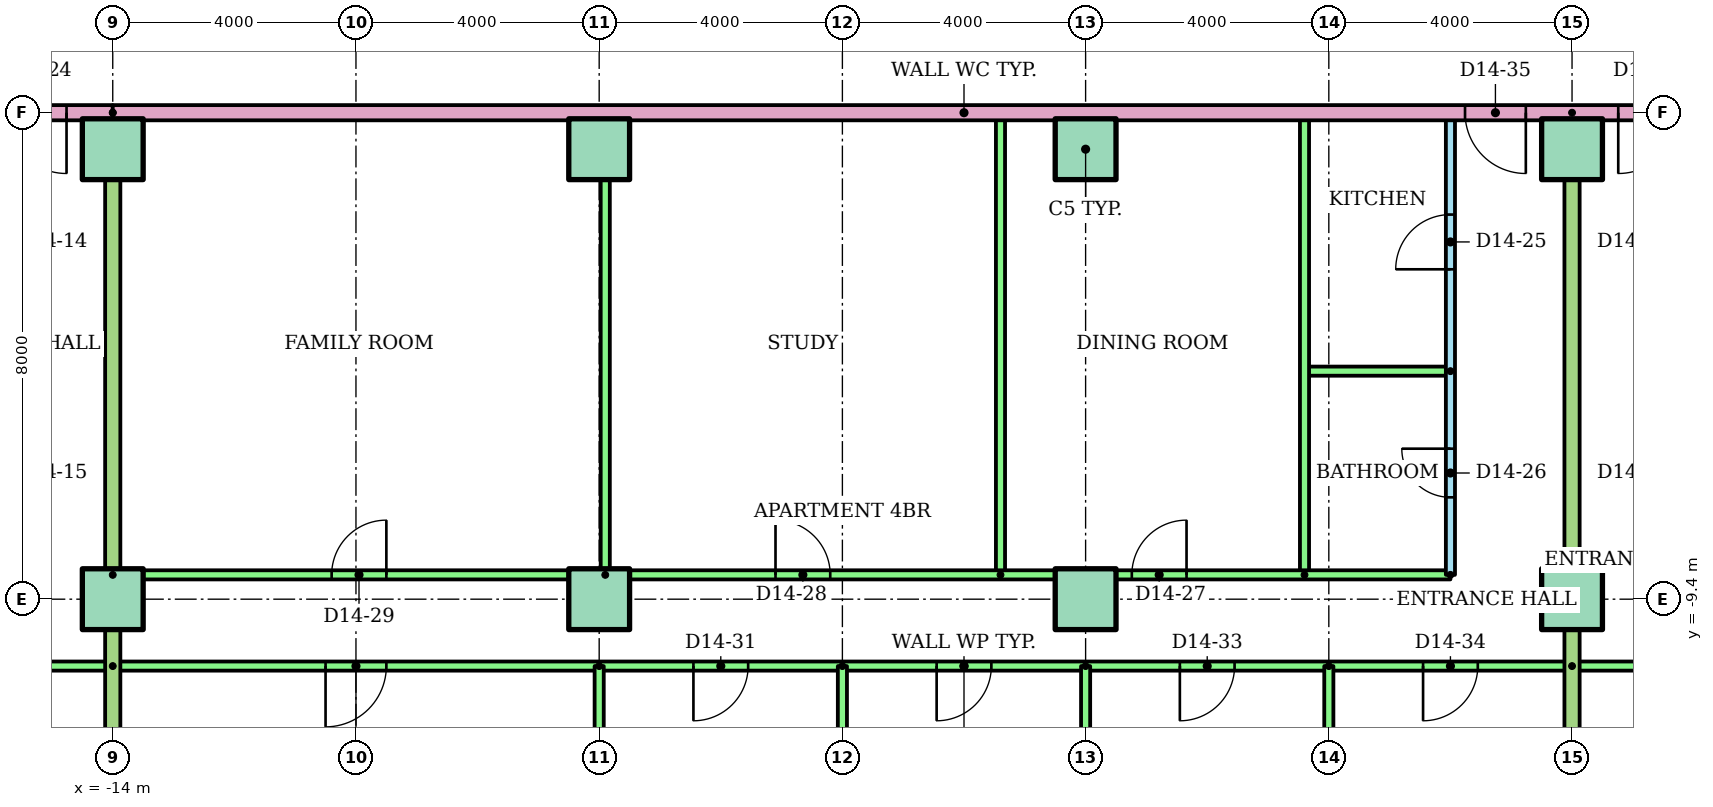
"""IFC4 building model, lengths in metres.
Left out: names, types, materials, properties, quantities, classifications, styles, units other than length and angle.
Written with IfcOpenShell. Run it as: python <this file> out.ifc"""

import sys

from ifc_helpers import new_model, si_unit, direction, frame, frame_2d, origin, origin_2d, place, context, subcontext, project, spatial, rectangle, extrude, element, fill, save


model = new_model("IFC4")
c1 = context("Model", 3, precision=1e-05, world=origin(), true_north=direction((0.0, 1.0)))
c2 = subcontext(c1, "Body", "Model", "MODEL_VIEW")
j1 = project(units=[si_unit("LENGTHUNIT", "METRE"), si_unit("PLANEANGLEUNIT", "RADIAN")], contexts=[c1])
p1 = place(None, origin())
s1 = spatial("IfcSite", under=j1, at=p1, CompositionType="ELEMENT")
p2 = place(p1, origin())
s2 = spatial("IfcBuilding", under=s1, at=p2, CompositionType="ELEMENT")
p3 = place(p2, frame((0.0, 0.0, 54.4)))
s3 = spatial("IfcBuildingStorey", under=s2, at=p3, CompositionType="ELEMENT", Elevation=54.4)
for number, where in (
    (1, (-14.0, -9.4, 0.0)),
    (2, (-6.0, -9.4, 0.0)),
    (3, (2.0, -9.4, 0.0)),
    (4, (10.0, -9.4, 0.0)),
    (5, (-14.0, -2.0, 0.0)),
    (6, (-6.0, -2.0, 0.0)),
    (7, (2.0, -2.0, 0.0)),
    (8, (10.0, -2.0, 0.0)),
):
    element("IfcColumn", number, at=place(p3, frame(where)), inside=s3, PredefinedType="COLUMN", context=c2, shape_type="SweptSolid", body=[
        extrude(rectangle(XDim=1.0, YDim=1.0, at=origin_2d()), origin(), (0.0, 0.0, 1.0), 3.2),
    ])
p4 = place(p3, frame((-14.0, -10.5, 0.0), z_axis=(0.0, 0.0, 1.0), x_axis=(-1.0, 0.0, 0.0)))
e9 = element("IfcWall", 9, at=p4, inside=s3, PredefinedType="PARTITIONING", context=c2, shape_type="SweptSolid", body=[
    extrude(rectangle(XDim=22.52, YDim=0.15, at=frame_2d((11.26, 0.0))), origin(), (0.0, 0.0, 1.0), 2.4),
])
p5 = place(p4, frame((19.6, 0.0, 0.0)))
e10 = element("IfcOpeningElement", 10, at=p5, cuts=e9, PredefinedType="OPENING", context=c2, shape_type="SweptSolid", body=[
    extrude(rectangle(XDim=0.9, YDim=2.1, at=frame_2d((0.45, 1.05))), frame((0.0, 0.085, 0.0), z_axis=(0.0, -1.0, 0.0), x_axis=(1.0, 0.0, 0.0)), (0.0, 0.0, 1.0), 0.17),
])
p6 = place(p4, frame((14.14, 0.0, 0.0)))
e11 = element("IfcOpeningElement", 11, at=p6, cuts=e9, PredefinedType="OPENING", context=c2, shape_type="SweptSolid", body=[
    extrude(rectangle(XDim=0.9, YDim=2.1, at=frame_2d((0.45, 1.05))), frame((0.0, 0.085, 0.0), z_axis=(0.0, -1.0, 0.0), x_axis=(1.0, 0.0, 0.0)), (0.0, 0.0, 1.0), 0.17),
])
p7 = place(p4, frame((9.55, 0.0, 0.0)))
e12 = element("IfcOpeningElement", 12, at=p7, cuts=e9, PredefinedType="OPENING", context=c2, shape_type="SweptSolid", body=[
    extrude(rectangle(XDim=0.9, YDim=2.1, at=frame_2d((0.45, 1.05))), frame((0.0, 0.085, 0.0), z_axis=(0.0, -1.0, 0.0), x_axis=(1.0, 0.0, 0.0)), (0.0, 0.0, 1.0), 0.17),
])
p8 = place(p4, frame((3.5, 0.0, 0.0)))
e13 = element("IfcOpeningElement", 13, at=p8, cuts=e9, PredefinedType="OPENING", context=c2, shape_type="SweptSolid", body=[
    extrude(rectangle(XDim=1.0, YDim=2.1, at=frame_2d((0.5, 1.05))), frame((0.0, 0.085, 0.0), z_axis=(0.0, -1.0, 0.0), x_axis=(1.0, 0.0, 0.0)), (0.0, 0.0, 1.0), 0.17),
])
p9 = place(p3, frame((8.0, -9.0, 0.0), z_axis=(0.0, 0.0, 1.0), x_axis=(0.0, 1.0, 0.0)))
e14 = element("IfcWall", 14, at=p9, inside=s3, PredefinedType="PARTITIONING", context=c2, shape_type="SweptSolid", body=[
    extrude(rectangle(XDim=7.6, YDim=0.15, at=frame_2d((3.8, 0.0))), origin(), (0.0, 0.0, 1.0), 2.4),
])
p10 = place(p9, frame((5.025, 0.0, 0.0)))
e15 = element("IfcOpeningElement", 15, at=p10, cuts=e14, PredefinedType="OPENING", context=c2, shape_type="SweptSolid", body=[
    extrude(rectangle(XDim=0.9, YDim=2.1, at=frame_2d((0.45, 1.05))), frame((0.0, 0.085, 0.0), z_axis=(0.0, -1.0, 0.0), x_axis=(1.0, 0.0, 0.0)), (0.0, 0.0, 1.0), 0.17),
])
p11 = place(p9, frame((1.275, 0.0, 0.0)))
e16 = element("IfcOpeningElement", 16, at=p11, cuts=e14, PredefinedType="OPENING", context=c2, shape_type="SweptSolid", body=[
    extrude(rectangle(XDim=0.8, YDim=2.1, at=frame_2d((0.4, 1.05))), frame((0.0, 0.085, 0.0), z_axis=(0.0, -1.0, 0.0), x_axis=(1.0, 0.0, 0.0)), (0.0, 0.0, 1.0), 0.17),
])
p12 = place(p3, frame((8.0, -5.65, 0.0), z_axis=(0.0, 0.0, 1.0), x_axis=(-1.0, 0.0, 0.0)))
e17 = element("IfcWall", 17, at=p12, inside=s3, PredefinedType="PARTITIONING", context=c2, shape_type="SweptSolid", body=[
    extrude(rectangle(XDim=2.4, YDim=0.15, at=frame_2d((1.2, 0.0))), origin(), (0.0, 0.0, 1.0), 2.4),
])
for number, where, z_axis, x_axis in (
    (18, (5.6, -9.0, 0.0), (0.0, 0.0, 1.0), (0.0, 1.0, 0.0)),
    (19, (0.6, -9.0, 0.0), (0.0, 0.0, 1.0), (0.0, 1.0, 0.0)),
    (20, (-5.9, -9.0, 0.0), (0.0, 0.0, 1.0), (0.0, 1.0, 0.0)),
):
    element("IfcWall", number, at=place(p3, frame(where, z_axis=z_axis, x_axis=x_axis)), inside=s3, PredefinedType="PARTITIONING", context=c2, shape_type="SweptSolid", body=[
        extrude(rectangle(XDim=7.6, YDim=0.15, at=frame_2d((3.8, 0.0))), origin(), (0.0, 0.0, 1.0), 2.4),
    ])
p13 = place(p3, frame((-14.0, -9.0, 0.0)))
e21 = element("IfcWall", 21, at=p13, inside=s3, PredefinedType="PARTITIONING", context=c2, shape_type="SweptSolid", body=[
    extrude(rectangle(XDim=22.0, YDim=0.15, at=frame_2d((11.0, 0.0))), origin(), (0.0, 0.0, 1.0), 2.4),
])
p14 = place(p13, frame((16.76, 0.0, 0.0)))
e22 = element("IfcOpeningElement", 22, at=p14, cuts=e21, PredefinedType="OPENING", context=c2, shape_type="SweptSolid", body=[
    extrude(rectangle(XDim=0.9, YDim=2.1, at=frame_2d((0.45, 1.05))), frame((0.0, 0.085, 0.0), z_axis=(0.0, -1.0, 0.0), x_axis=(1.0, 0.0, 0.0)), (0.0, 0.0, 1.0), 0.17),
])
p15 = place(p13, frame((10.9, 0.0, 0.0)))
e23 = element("IfcOpeningElement", 23, at=p15, cuts=e21, PredefinedType="OPENING", context=c2, shape_type="SweptSolid", body=[
    extrude(rectangle(XDim=0.9, YDim=2.1, at=frame_2d((0.45, 1.05))), frame((0.0, 0.085, 0.0), z_axis=(0.0, -1.0, 0.0), x_axis=(1.0, 0.0, 0.0)), (0.0, 0.0, 1.0), 0.17),
])
p16 = place(p13, frame((3.6, 0.0, 0.0)))
e24 = element("IfcOpeningElement", 24, at=p16, cuts=e21, PredefinedType="OPENING", context=c2, shape_type="SweptSolid", body=[
    extrude(rectangle(XDim=0.9, YDim=2.1, at=frame_2d((0.45, 1.05))), frame((0.0, 0.085, 0.0), z_axis=(0.0, -1.0, 0.0), x_axis=(1.0, 0.0, 0.0)), (0.0, 0.0, 1.0), 0.17),
])
p17 = place(p3, frame((10.0, -10.5, 0.0), z_axis=(0.0, 0.0, 1.0), x_axis=(-1.0, 0.0, 0.0)))
e25 = element("IfcWall", 25, at=p17, inside=s3, PredefinedType="PARTITIONING", context=c2, shape_type="SweptSolid", body=[
    extrude(rectangle(XDim=24.0, YDim=0.15, at=frame_2d((12.0, 0.0))), origin(), (0.0, 0.0, 1.0), 2.4),
])
p18 = place(p17, frame((19.5, 0.0, 0.0)))
e26 = element("IfcOpeningElement", 26, at=p18, cuts=e25, PredefinedType="OPENING", context=c2, shape_type="SweptSolid", body=[
    extrude(rectangle(XDim=1.0, YDim=2.1, at=frame_2d((0.5, 1.05))), frame((0.0, 0.085, 0.0), z_axis=(0.0, -1.0, 0.0), x_axis=(1.0, 0.0, 0.0)), (0.0, 0.0, 1.0), 0.17),
])
p19 = place(p17, frame((13.55, 0.0, 0.0)))
e27 = element("IfcOpeningElement", 27, at=p19, cuts=e25, PredefinedType="OPENING", context=c2, shape_type="SweptSolid", body=[
    extrude(rectangle(XDim=0.9, YDim=2.1, at=frame_2d((0.45, 1.05))), frame((0.0, 0.085, 0.0), z_axis=(0.0, -1.0, 0.0), x_axis=(1.0, 0.0, 0.0)), (0.0, 0.0, 1.0), 0.17),
])
p20 = place(p17, frame((9.55, 0.0, 0.0)))
e28 = element("IfcOpeningElement", 28, at=p20, cuts=e25, PredefinedType="OPENING", context=c2, shape_type="SweptSolid", body=[
    extrude(rectangle(XDim=0.9, YDim=2.1, at=frame_2d((0.45, 1.05))), frame((0.0, 0.085, 0.0), z_axis=(0.0, -1.0, 0.0), x_axis=(1.0, 0.0, 0.0)), (0.0, 0.0, 1.0), 0.17),
])
p21 = place(p17, frame((5.55, 0.0, 0.0)))
e29 = element("IfcOpeningElement", 29, at=p21, cuts=e25, PredefinedType="OPENING", context=c2, shape_type="SweptSolid", body=[
    extrude(rectangle(XDim=0.9, YDim=2.1, at=frame_2d((0.45, 1.05))), frame((0.0, 0.085, 0.0), z_axis=(0.0, -1.0, 0.0), x_axis=(1.0, 0.0, 0.0)), (0.0, 0.0, 1.0), 0.17),
])
p22 = place(p17, frame((1.55, 0.0, 0.0)))
e30 = element("IfcOpeningElement", 30, at=p22, cuts=e25, PredefinedType="OPENING", context=c2, shape_type="SweptSolid", body=[
    extrude(rectangle(XDim=0.9, YDim=2.1, at=frame_2d((0.45, 1.05))), frame((0.0, 0.085, 0.0), z_axis=(0.0, -1.0, 0.0), x_axis=(1.0, 0.0, 0.0)), (0.0, 0.0, 1.0), 0.17),
])
p23 = place(p3, frame((-6.0, -10.5, 0.0), z_axis=(0.0, 0.0, 1.0), x_axis=(0.0, -1.0, 0.0)))
e31 = element("IfcWall", 31, at=p23, inside=s3, PredefinedType="PARTITIONING", context=c2, shape_type="SweptSolid", body=[
    extrude(rectangle(XDim=5.61, YDim=0.15, at=frame_2d((2.805, 0.0))), origin(), (0.0, 0.0, 1.0), 2.4),
])
p24 = place(p3, frame((-2.0, -10.5, 0.0), z_axis=(0.0, 0.0, 1.0), x_axis=(0.0, -1.0, 0.0)))
e32 = element("IfcWall", 32, at=p24, inside=s3, PredefinedType="PARTITIONING", context=c2, shape_type="SweptSolid", body=[
    extrude(rectangle(XDim=5.621, YDim=0.15, at=frame_2d((2.811, 0.0))), origin(), (0.0, 0.0, 1.0), 2.4),
])
p25 = place(p3, frame((2.0, -10.5, 0.0), z_axis=(0.0, 0.0, 1.0), x_axis=(0.0, -1.0, 0.0)))
e33 = element("IfcWall", 33, at=p25, inside=s3, PredefinedType="PARTITIONING", context=c2, shape_type="SweptSolid", body=[
    extrude(rectangle(XDim=5.61, YDim=0.15, at=frame_2d((2.805, 0.0))), origin(), (0.0, 0.0, 1.0), 2.4),
])
p26 = place(p3, frame((6.0, -10.5, 0.0), z_axis=(0.0, 0.0, 1.0), x_axis=(0.0, -1.0, 0.0)))
e34 = element("IfcWall", 34, at=p26, inside=s3, PredefinedType="PARTITIONING", context=c2, shape_type="SweptSolid", body=[
    extrude(rectangle(XDim=5.621, YDim=0.15, at=frame_2d((2.811, 0.0))), origin(), (0.0, 0.0, 1.0), 2.4),
])
p27 = place(p3, frame((-14.0, -1.4, 0.0), z_axis=(0.0, 0.0, 1.0), x_axis=(0.0, -1.0, 0.0)))
e35 = element("IfcWall", 35, at=p27, inside=s3, PredefinedType="PARTITIONING", context=c2, shape_type="SweptSolid", body=[
    extrude(rectangle(XDim=14.71, YDim=0.25, at=frame_2d((7.355, 0.0))), origin(), (0.0, 0.0, 1.0), 2.4),
])
p28 = place(p3, frame((36.52, -10.5, 0.0), z_axis=(0.0, 0.0, 1.0), x_axis=(-1.0, 0.0, 0.0)))
e36 = element("IfcWall", 36, at=p28, inside=s3, PredefinedType="PARTITIONING", context=c2, shape_type="SweptSolid", body=[
    extrude(rectangle(XDim=26.52, YDim=0.15, at=frame_2d((13.26, 0.0))), origin(), (0.0, 0.0, 1.0), 2.4),
])
p29 = place(p28, frame((22.02, 0.0, 0.0)))
e37 = element("IfcOpeningElement", 37, at=p29, cuts=e36, PredefinedType="OPENING", context=c2, shape_type="SweptSolid", body=[
    extrude(rectangle(XDim=1.0, YDim=2.1, at=frame_2d((0.5, 1.05))), frame((0.0, 0.085, 0.0), z_axis=(0.0, -1.0, 0.0), x_axis=(1.0, 0.0, 0.0)), (0.0, 0.0, 1.0), 0.17),
])
p30 = place(p28, frame((16.07, 0.0, 0.0)))
e38 = element("IfcOpeningElement", 38, at=p30, cuts=e36, PredefinedType="OPENING", context=c2, shape_type="SweptSolid", body=[
    extrude(rectangle(XDim=0.9, YDim=2.1, at=frame_2d((0.45, 1.05))), frame((0.0, 0.085, 0.0), z_axis=(0.0, -1.0, 0.0), x_axis=(1.0, 0.0, 0.0)), (0.0, 0.0, 1.0), 0.17),
])
p31 = place(p28, frame((12.07, 0.0, 0.0)))
e39 = element("IfcOpeningElement", 39, at=p31, cuts=e36, PredefinedType="OPENING", context=c2, shape_type="SweptSolid", body=[
    extrude(rectangle(XDim=0.9, YDim=2.1, at=frame_2d((0.45, 1.05))), frame((0.0, 0.085, 0.0), z_axis=(0.0, -1.0, 0.0), x_axis=(1.0, 0.0, 0.0)), (0.0, 0.0, 1.0), 0.17),
])
p32 = place(p28, frame((6.87, 0.0, 0.0)))
e40 = element("IfcOpeningElement", 40, at=p32, cuts=e36, PredefinedType="OPENING", context=c2, shape_type="SweptSolid", body=[
    extrude(rectangle(XDim=0.9, YDim=2.1, at=frame_2d((0.45, 1.05))), frame((0.0, 0.085, 0.0), z_axis=(0.0, -1.0, 0.0), x_axis=(1.0, 0.0, 0.0)), (0.0, 0.0, 1.0), 0.17),
])
p33 = place(p28, frame((0.86, 0.0, 0.0)))
e41 = element("IfcOpeningElement", 41, at=p33, cuts=e36, PredefinedType="OPENING", context=c2, shape_type="SweptSolid", body=[
    extrude(rectangle(XDim=0.9, YDim=2.1, at=frame_2d((0.45, 1.05))), frame((0.0, 0.085, 0.0), z_axis=(0.0, -1.0, 0.0), x_axis=(1.0, 0.0, 0.0)), (0.0, 0.0, 1.0), 0.17),
])
p34 = place(p3, frame((10.0, -1.4, 0.0), z_axis=(0.0, 0.0, 1.0), x_axis=(0.0, -1.0, 0.0)))
e42 = element("IfcWall", 42, at=p34, inside=s3, PredefinedType="PARTITIONING", context=c2, shape_type="SweptSolid", body=[
    extrude(rectangle(XDim=14.71, YDim=0.25, at=frame_2d((7.355, 0.0))), origin(), (0.0, 0.0, 1.0), 2.4),
])
p35 = place(p3, frame((-14.0, -1.4, 0.0), z_axis=(0.0, 0.0, 1.0), x_axis=(-1.0, 0.0, 0.0)))
e43 = element("IfcWall", 43, at=p35, inside=s3, PredefinedType="PARTITIONING", context=c2, shape_type="SweptSolid", body=[
    extrude(rectangle(XDim=15.0, YDim=0.25, at=frame_2d((7.5, 0.0))), origin(), (0.0, 0.0, 1.0), 2.4),
])
p36 = place(p35, frame((0.76, 0.0, 0.0)))
e44 = element("IfcOpeningElement", 44, at=p36, cuts=e43, PredefinedType="OPENING", context=c2, shape_type="SweptSolid", body=[
    extrude(rectangle(XDim=1.0, YDim=2.1, at=frame_2d((0.5, 1.05))), frame((0.0, 0.135, 0.0), z_axis=(0.0, -1.0, 0.0), x_axis=(1.0, 0.0, 0.0)), (0.0, 0.0, 1.0), 0.27),
])
p37 = place(p3, frame((14.0, -1.4, 0.0), z_axis=(0.0, 0.0, 1.0), x_axis=(-1.0, 0.0, 0.0)))
e45 = element("IfcWall", 45, at=p37, inside=s3, PredefinedType="PARTITIONING", context=c2, shape_type="SweptSolid", body=[
    extrude(rectangle(XDim=28.0, YDim=0.25, at=frame_2d((14.0, 0.0))), origin(), (0.0, 0.0, 1.0), 2.4),
])
p38 = place(p37, frame((4.76, 0.0, 0.0)))
e46 = element("IfcOpeningElement", 46, at=p38, cuts=e45, PredefinedType="OPENING", context=c2, shape_type="SweptSolid", body=[
    extrude(rectangle(XDim=1.0, YDim=2.1, at=frame_2d((0.5, 1.05))), frame((0.0, 0.135, 0.0), z_axis=(0.0, -1.0, 0.0), x_axis=(1.0, 0.0, 0.0)), (0.0, 0.0, 1.0), 0.27),
])
p39 = place(p37, frame((2.24, 0.0, 0.0)))
e47 = element("IfcOpeningElement", 47, at=p39, cuts=e45, PredefinedType="OPENING", context=c2, shape_type="SweptSolid", body=[
    extrude(rectangle(XDim=1.0, YDim=2.1, at=frame_2d((0.5, 1.05))), frame((0.0, 0.135, 0.0), z_axis=(0.0, -1.0, 0.0), x_axis=(1.0, 0.0, 0.0)), (0.0, 0.0, 1.0), 0.27),
])
p40 = place(p36, origin())
e48 = element("IfcDoor", 48, at=p40, inside=s3, OperationType="SINGLE_SWING_LEFT", PredefinedType="DOOR", context=c2, shape_type="SweptSolid", body=[
    extrude(rectangle(XDim=1.0, YDim=2.1, at=frame_2d((0.5, 1.05))), frame((0.0, 0.025, 0.0), z_axis=(0.0, -1.0, 0.0), x_axis=(1.0, 0.0, 0.0)), (0.0, 0.0, 1.0), 0.05),
])
fill(e44, e48)
p41 = place(p10, origin())
e49 = element("IfcDoor", 49, at=p41, inside=s3, OperationType="SINGLE_SWING_LEFT", PredefinedType="DOOR", context=c2, shape_type="SweptSolid", body=[
    extrude(rectangle(XDim=0.9, YDim=2.1, at=frame_2d((0.45, 1.05))), frame((0.0, 0.025, 0.0), z_axis=(0.0, -1.0, 0.0), x_axis=(1.0, 0.0, 0.0)), (0.0, 0.0, 1.0), 0.05),
])
fill(e15, e49)
p42 = place(p11, origin())
e50 = element("IfcDoor", 50, at=p42, inside=s3, OperationType="SINGLE_SWING_RIGHT", PredefinedType="DOOR", context=c2, shape_type="SweptSolid", body=[
    extrude(rectangle(XDim=0.8, YDim=2.1, at=frame_2d((0.4, 1.05))), frame((0.0, 0.025, 0.0), z_axis=(0.0, -1.0, 0.0), x_axis=(1.0, 0.0, 0.0)), (0.0, 0.0, 1.0), 0.05),
])
fill(e16, e50)
p43 = place(p14, origin())
e51 = element("IfcDoor", 51, at=p43, inside=s3, OperationType="SINGLE_SWING_RIGHT", PredefinedType="DOOR", context=c2, shape_type="SweptSolid", body=[
    extrude(rectangle(XDim=0.9, YDim=2.1, at=frame_2d((0.45, 1.05))), frame((0.0, 0.025, 0.0), z_axis=(0.0, -1.0, 0.0), x_axis=(1.0, 0.0, 0.0)), (0.0, 0.0, 1.0), 0.05),
])
fill(e22, e51)
p44 = place(p15, origin())
e52 = element("IfcDoor", 52, at=p44, inside=s3, OperationType="SINGLE_SWING_LEFT", PredefinedType="DOOR", context=c2, shape_type="SweptSolid", body=[
    extrude(rectangle(XDim=0.9, YDim=2.1, at=frame_2d((0.45, 1.05))), frame((0.0, 0.025, 0.0), z_axis=(0.0, -1.0, 0.0), x_axis=(1.0, 0.0, 0.0)), (0.0, 0.0, 1.0), 0.05),
])
fill(e23, e52)
p45 = place(p16, origin())
e53 = element("IfcDoor", 53, at=p45, inside=s3, OperationType="SINGLE_SWING_RIGHT", PredefinedType="DOOR", context=c2, shape_type="SweptSolid", body=[
    extrude(rectangle(XDim=0.9, YDim=2.1, at=frame_2d((0.45, 1.05))), frame((0.0, 0.025, 0.0), z_axis=(0.0, -1.0, 0.0), x_axis=(1.0, 0.0, 0.0)), (0.0, 0.0, 1.0), 0.05),
])
fill(e24, e53)
p46 = place(p18, origin())
e54 = element("IfcDoor", 54, at=p46, inside=s3, OperationType="SINGLE_SWING_RIGHT", PredefinedType="DOOR", context=c2, shape_type="SweptSolid", body=[
    extrude(rectangle(XDim=1.0, YDim=2.1, at=frame_2d((0.5, 1.05))), frame((0.0, 0.025, 0.0), z_axis=(0.0, -1.0, 0.0), x_axis=(1.0, 0.0, 0.0)), (0.0, 0.0, 1.0), 0.05),
])
fill(e26, e54)
p47 = place(p19, origin())
e55 = element("IfcDoor", 55, at=p47, inside=s3, OperationType="SINGLE_SWING_RIGHT", PredefinedType="DOOR", context=c2, shape_type="SweptSolid", body=[
    extrude(rectangle(XDim=0.9, YDim=2.1, at=frame_2d((0.45, 1.05))), frame((0.0, 0.025, 0.0), z_axis=(0.0, -1.0, 0.0), x_axis=(1.0, 0.0, 0.0)), (0.0, 0.0, 1.0), 0.05),
])
fill(e27, e55)
p48 = place(p20, origin())
e56 = element("IfcDoor", 56, at=p48, inside=s3, OperationType="SINGLE_SWING_RIGHT", PredefinedType="DOOR", context=c2, shape_type="SweptSolid", body=[
    extrude(rectangle(XDim=0.9, YDim=2.1, at=frame_2d((0.45, 1.05))), frame((0.0, 0.025, 0.0), z_axis=(0.0, -1.0, 0.0), x_axis=(1.0, 0.0, 0.0)), (0.0, 0.0, 1.0), 0.05),
])
fill(e28, e56)
p49 = place(p21, origin())
e57 = element("IfcDoor", 57, at=p49, inside=s3, OperationType="SINGLE_SWING_RIGHT", PredefinedType="DOOR", context=c2, shape_type="SweptSolid", body=[
    extrude(rectangle(XDim=0.9, YDim=2.1, at=frame_2d((0.45, 1.05))), frame((0.0, 0.025, 0.0), z_axis=(0.0, -1.0, 0.0), x_axis=(1.0, 0.0, 0.0)), (0.0, 0.0, 1.0), 0.05),
])
fill(e29, e57)
p50 = place(p22, origin())
e58 = element("IfcDoor", 58, at=p50, inside=s3, OperationType="SINGLE_SWING_RIGHT", PredefinedType="DOOR", context=c2, shape_type="SweptSolid", body=[
    extrude(rectangle(XDim=0.9, YDim=2.1, at=frame_2d((0.45, 1.05))), frame((0.0, 0.025, 0.0), z_axis=(0.0, -1.0, 0.0), x_axis=(1.0, 0.0, 0.0)), (0.0, 0.0, 1.0), 0.05),
])
fill(e30, e58)
p51 = place(p38, origin())
e59 = element("IfcDoor", 59, at=p51, inside=s3, OperationType="SINGLE_SWING_LEFT", PredefinedType="DOOR", context=c2, shape_type="SweptSolid", body=[
    extrude(rectangle(XDim=1.0, YDim=2.1, at=frame_2d((0.5, 1.05))), frame((0.0, 0.025, 0.0), z_axis=(0.0, -1.0, 0.0), x_axis=(1.0, 0.0, 0.0)), (0.0, 0.0, 1.0), 0.05),
])
fill(e46, e59)
p52 = place(p39, origin())
e60 = element("IfcDoor", 60, at=p52, inside=s3, OperationType="SINGLE_SWING_RIGHT", PredefinedType="DOOR", context=c2, shape_type="SweptSolid", body=[
    extrude(rectangle(XDim=1.0, YDim=2.1, at=frame_2d((0.5, 1.05))), frame((0.0, 0.025, 0.0), z_axis=(0.0, -1.0, 0.0), x_axis=(1.0, 0.0, 0.0)), (0.0, 0.0, 1.0), 0.05),
])
fill(e47, e60)
save(model, sys.argv[1])
